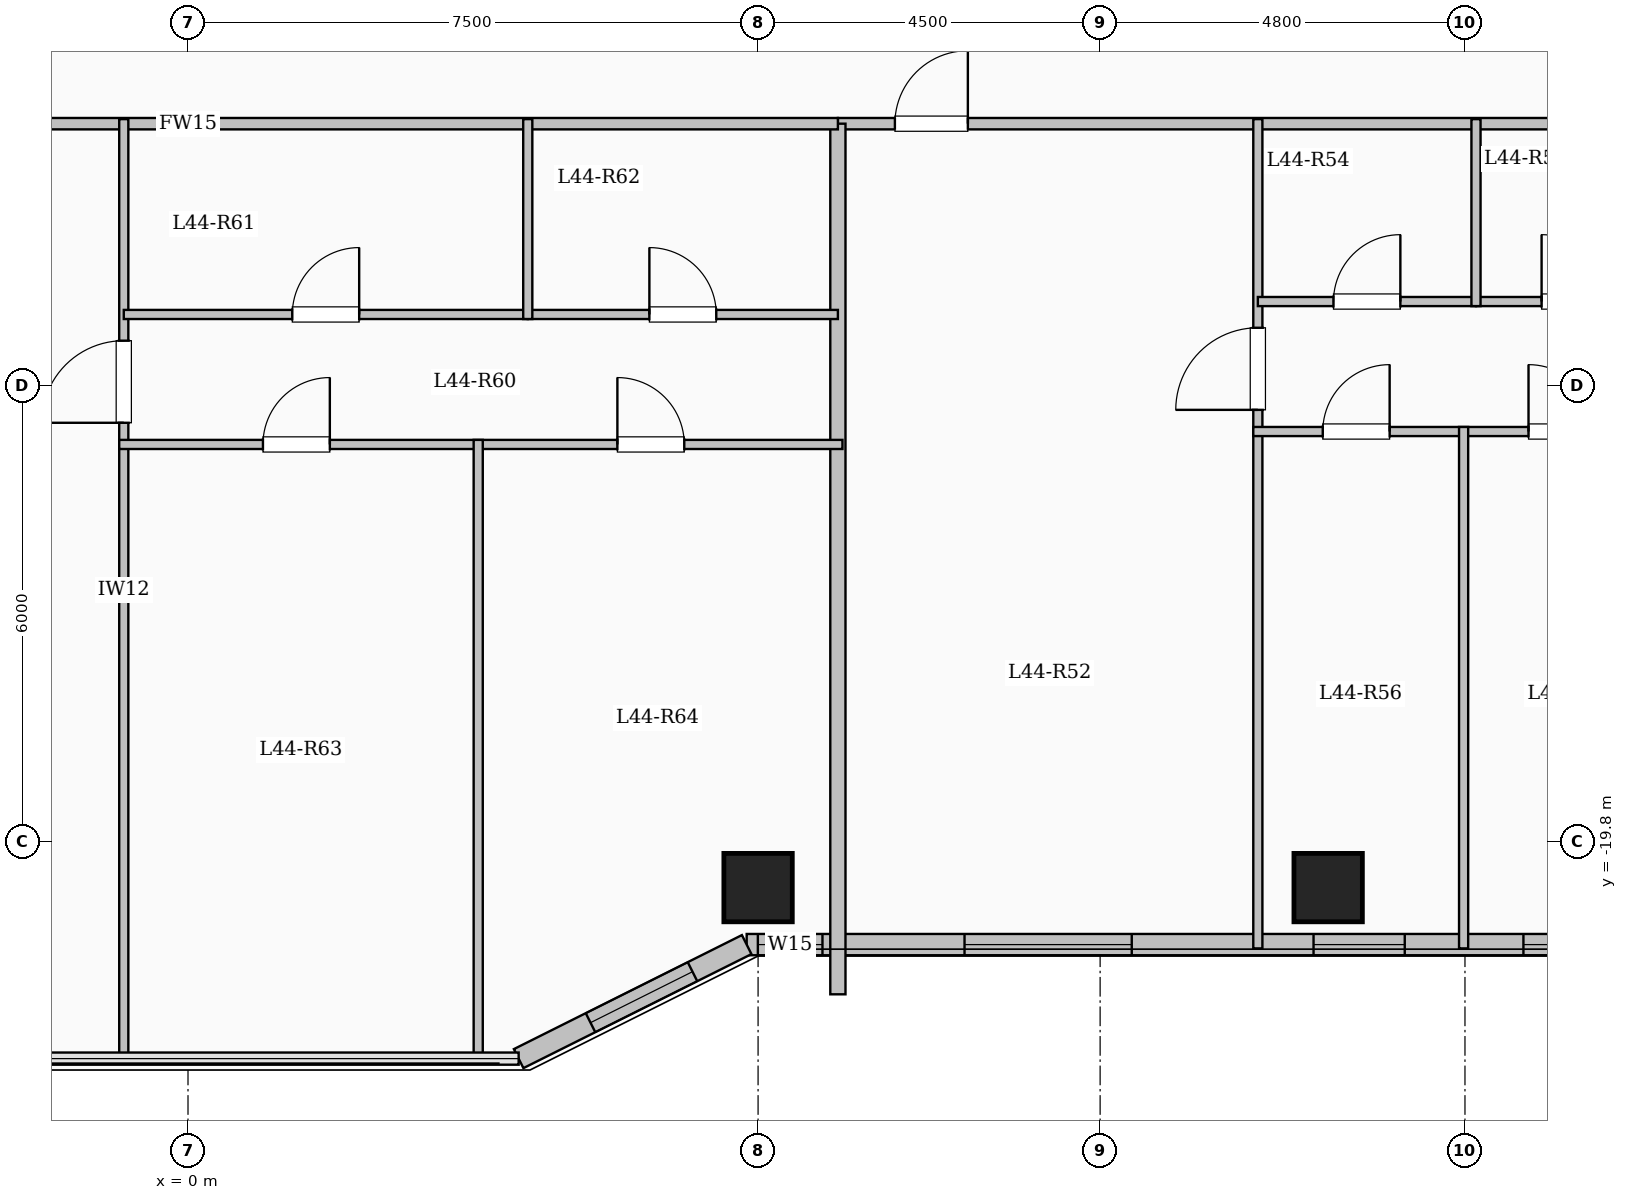
"""IFC4 building model, lengths in metres.
Left out: names, types, materials, properties, quantities, classifications, styles, units other than length and angle.
Written with IfcOpenShell. Run it as: python <this file> out.ifc"""

import sys

from ifc_helpers import new_model, si_unit, direction, frame, frame_2d, origin, origin_2d, place, context, subcontext, project, spatial, rectangle, extrude, element, fill, save


model = new_model("IFC4")
c1 = context("Model", 3, precision=1e-05, world=origin(), true_north=direction((0.0, 1.0)))
c2 = subcontext(c1, "Body", "Model", "MODEL_VIEW")
j1 = project(units=[si_unit("LENGTHUNIT", "METRE"), si_unit("PLANEANGLEUNIT", "RADIAN")], contexts=[c1])
p1 = place(None, origin())
s1 = spatial("IfcSite", under=j1, at=p1, CompositionType="ELEMENT")
p2 = place(p1, origin())
s2 = spatial("IfcBuilding", under=s1, at=p2, CompositionType="ELEMENT")
p3 = place(p2, frame((0.0, 0.0, 162.75)))
s3 = spatial("IfcBuildingStorey", under=s2, at=p3, CompositionType="ELEMENT", Elevation=162.75)
for number, where, z_axis, x_axis in (
    (1, (7.5, -20.4, 0.0), (0.0, 0.0, 1.0), (1.0, 0.0, 0.0)),
    (2, (15.0, -20.4, 0.0), (0.0, 0.0, 1.0), (1.0, 0.0, 0.0)),
):
    element("IfcColumn", number, at=place(p3, frame(where, z_axis=z_axis, x_axis=x_axis)), inside=s3, PredefinedType="COLUMN", context=c2, shape_type="SweptSolid", body=[
        extrude(rectangle(XDim=0.9, YDim=0.9, at=origin_2d()), origin(), (0.0, 0.0, 1.0), 3.35),
    ])
p4 = place(p3, frame((19.65, -21.15, 0.0), z_axis=(0.0, 0.0, 1.0), x_axis=(-1.0, 0.0, 0.0)))
e3 = element("IfcWall", 3, at=p4, inside=s3, PredefinedType="SOLIDWALL", context=c2, shape_type="SweptSolid", body=[
    extrude(rectangle(XDim=12.3, YDim=0.28, at=frame_2d((6.15, 0.0))), origin(), (0.0, 0.0, 1.0), 3.1),
])
p5 = place(p4, frame((0.881, 0.0, 0.95)))
e4 = element("IfcOpeningElement", 4, at=p5, cuts=e3, PredefinedType="OPENING", context=c2, shape_type="SweptSolid", body=[
    extrude(rectangle(XDim=1.2, YDim=1.5, at=frame_2d((0.6, 0.75))), frame((0.0, 0.15, 0.0), z_axis=(0.0, -1.0, 0.0), x_axis=(1.0, 0.0, 0.0)), (0.0, 0.0, 1.0), 0.3),
])
p6 = place(p4, frame((3.642, 0.0, 0.95)))
e5 = element("IfcOpeningElement", 5, at=p6, cuts=e3, PredefinedType="OPENING", context=c2, shape_type="SweptSolid", body=[
    extrude(rectangle(XDim=1.2, YDim=1.5, at=frame_2d((0.6, 0.75))), frame((0.0, 0.15, 0.0), z_axis=(0.0, -1.0, 0.0), x_axis=(1.0, 0.0, 0.0)), (0.0, 0.0, 1.0), 0.3),
])
p7 = place(p4, frame((7.234, 0.0, 0.9)))
e6 = element("IfcOpeningElement", 6, at=p7, cuts=e3, PredefinedType="OPENING", context=c2, shape_type="SweptSolid", body=[
    extrude(rectangle(XDim=2.2, YDim=1.75, at=frame_2d((1.1, 0.875))), frame((0.0, 0.15, 0.0), z_axis=(0.0, -1.0, 0.0), x_axis=(1.0, 0.0, 0.0)), (0.0, 0.0, 1.0), 0.3),
])
p8 = place(p4, frame((11.303, 0.0, 0.95)))
e7 = element("IfcOpeningElement", 7, at=p8, cuts=e3, PredefinedType="OPENING", context=c2, shape_type="SweptSolid", body=[
    extrude(rectangle(XDim=0.85, YDim=1.5, at=frame_2d((0.425, 0.75))), frame((0.0, 0.15, 0.0), z_axis=(0.0, -1.0, 0.0), x_axis=(1.0, 0.0, 0.0)), (0.0, 0.0, 1.0), 0.3),
])
p9 = place(p3, frame((7.35, -21.15, 0.0), z_axis=(0.0, 0.0, 1.0), x_axis=(-0.894427191, -0.4472135955, 0.0)))
e8 = element("IfcWall", 8, at=p9, inside=s3, PredefinedType="SOLIDWALL", context=c2, shape_type="SweptSolid", body=[
    extrude(rectangle(XDim=3.354, YDim=0.28, at=frame_2d((1.677, 0.0))), origin(), (0.0, 0.0, 1.0), 3.1),
])
p10 = place(p9, frame((0.797, 0.0, 0.9)))
e9 = element("IfcOpeningElement", 9, at=p10, cuts=e8, PredefinedType="OPENING", context=c2, shape_type="SweptSolid", body=[
    extrude(rectangle(XDim=1.5, YDim=1.65, at=frame_2d((0.75, 0.825))), frame((0.0, 0.15, 0.0), z_axis=(0.0, -1.0, 0.0), x_axis=(1.0, 0.0, 0.0)), (0.0, 0.0, 1.0), 0.3),
])
p11 = place(p3, frame((8.55, -10.35, 0.0), z_axis=(0.0, 0.0, 1.0), x_axis=(1.0, 0.0, 0.0)))
e10 = element("IfcWall", 10, at=p11, inside=s3, PredefinedType="PARTITIONING", context=c2, shape_type="SweptSolid", body=[
    extrude(rectangle(XDim=11.0, YDim=0.15, at=frame_2d((5.5, 0.0))), origin(), (0.0, 0.0, 1.0), 3.1),
])
p12 = place(p11, frame((0.75, 0.0, 0.0)))
e11 = element("IfcOpeningElement", 11, at=p12, cuts=e10, PredefinedType="OPENING", context=c2, shape_type="SweptSolid", body=[
    extrude(rectangle(XDim=0.96, YDim=2.15, at=frame_2d((0.48, 1.075))), frame((0.0, 0.085, 0.0), z_axis=(0.0, -1.0, 0.0), x_axis=(1.0, 0.0, 0.0)), (0.0, 0.0, 1.0), 0.17),
])
p13 = place(p3, frame((14.075, -21.2, 0.0), z_axis=(0.0, 0.0, 1.0), x_axis=(0.0, 1.0, 0.0)))
e12 = element("IfcWall", 12, at=p13, inside=s3, PredefinedType="PARTITIONING", context=c2, shape_type="SweptSolid", body=[
    extrude(rectangle(XDim=10.91, YDim=0.12, at=frame_2d((5.455, 0.0))), origin(), (0.0, 0.0, 1.0), 3.1),
])
p14 = place(p13, frame((7.085, 0.0, 0.0)))
e13 = element("IfcOpeningElement", 13, at=p14, cuts=e12, PredefinedType="OPENING", context=c2, shape_type="SweptSolid", body=[
    extrude(rectangle(XDim=1.08, YDim=2.15, at=frame_2d((0.54, 1.075))), frame((0.0, 0.07, 0.0), z_axis=(0.0, -1.0, 0.0), x_axis=(1.0, 0.0, 0.0)), (0.0, 0.0, 1.0), 0.14),
])
p15 = place(p3, frame((14.075, -12.69, 0.0), z_axis=(0.0, 0.0, 1.0), x_axis=(1.0, 0.0, 0.0)))
e14 = element("IfcWall", 14, at=p15, inside=s3, PredefinedType="PARTITIONING", context=c2, shape_type="SweptSolid", body=[
    extrude(rectangle(XDim=2.87, YDim=0.12, at=frame_2d((1.435, 0.0))), origin(), (0.0, 0.0, 1.0), 3.1),
])
p16 = place(p15, frame((0.995, 0.0, 0.0)))
e15 = element("IfcOpeningElement", 15, at=p16, cuts=e14, PredefinedType="OPENING", context=c2, shape_type="SweptSolid", body=[
    extrude(rectangle(XDim=0.88, YDim=2.1, at=frame_2d((0.44, 1.05))), frame((0.0, 0.07, 0.0), z_axis=(0.0, -1.0, 0.0), x_axis=(1.0, 0.0, 0.0)), (0.0, 0.0, 1.0), 0.14),
])
p17 = place(p3, frame((16.945, -12.69, 0.0), z_axis=(0.0, 0.0, 1.0), x_axis=(1.0, 0.0, 0.0)))
e16 = element("IfcWall", 16, at=p17, inside=s3, PredefinedType="PARTITIONING", context=c2, shape_type="SweptSolid", body=[
    extrude(rectangle(XDim=2.605, YDim=0.12, at=frame_2d((1.302, 0.0))), origin(), (0.0, 0.0, 1.0), 3.1),
])
p18 = place(p17, frame((0.863, 0.0, 0.0)))
e17 = element("IfcOpeningElement", 17, at=p18, cuts=e16, PredefinedType="OPENING", context=c2, shape_type="SweptSolid", body=[
    extrude(rectangle(XDim=0.88, YDim=2.1, at=frame_2d((0.44, 1.05))), frame((0.0, 0.07, 0.0), z_axis=(0.0, -1.0, 0.0), x_axis=(1.0, 0.0, 0.0)), (0.0, 0.0, 1.0), 0.14),
])
p19 = place(p3, frame((14.015, -14.4, 0.0), z_axis=(0.0, 0.0, 1.0), x_axis=(1.0, 0.0, 0.0)))
e18 = element("IfcWall", 18, at=p19, inside=s3, PredefinedType="PARTITIONING", context=c2, shape_type="SweptSolid", body=[
    extrude(rectangle(XDim=5.595, YDim=0.12, at=frame_2d((2.798, 0.0))), origin(), (0.0, 0.0, 1.0), 3.1),
])
p20 = place(p19, frame((0.914, 0.0, 0.0)))
e19 = element("IfcOpeningElement", 19, at=p20, cuts=e18, PredefinedType="OPENING", context=c2, shape_type="SweptSolid", body=[
    extrude(rectangle(XDim=0.88, YDim=2.1, at=frame_2d((0.44, 1.05))), frame((0.0, 0.07, 0.0), z_axis=(0.0, -1.0, 0.0), x_axis=(1.0, 0.0, 0.0)), (0.0, 0.0, 1.0), 0.14),
])
p21 = place(p19, frame((3.621, 0.0, 0.0)))
e20 = element("IfcOpeningElement", 20, at=p21, cuts=e18, PredefinedType="OPENING", context=c2, shape_type="SweptSolid", body=[
    extrude(rectangle(XDim=0.88, YDim=2.1, at=frame_2d((0.44, 1.05))), frame((0.0, 0.07, 0.0), z_axis=(0.0, -1.0, 0.0), x_axis=(1.0, 0.0, 0.0)), (0.0, 0.0, 1.0), 0.14),
])
p22 = place(p3, frame((16.945, -12.75, 0.0), z_axis=(0.0, 0.0, 1.0), x_axis=(0.0, 1.0, 0.0)))
e21 = element("IfcWall", 21, at=p22, inside=s3, PredefinedType="PARTITIONING", context=c2, shape_type="SweptSolid", body=[
    extrude(rectangle(XDim=2.46, YDim=0.12, at=frame_2d((1.23, 0.0))), origin(), (0.0, 0.0, 1.0), 3.1),
])
p23 = place(p3, frame((16.782, -21.2, 0.0), z_axis=(0.0, 0.0, 1.0), x_axis=(0.0, 1.0, 0.0)))
e22 = element("IfcWall", 22, at=p23, inside=s3, PredefinedType="PARTITIONING", context=c2, shape_type="SweptSolid", body=[
    extrude(rectangle(XDim=6.86, YDim=0.12, at=frame_2d((3.43, 0.0))), origin(), (0.0, 0.0, 1.0), 3.1),
])
p24 = place(p3, frame((8.55, -21.804, 0.0), z_axis=(0.0, 0.0, 1.0), x_axis=(0.0, 1.0, 0.0)))
e23 = element("IfcWall", 23, at=p24, inside=s3, PredefinedType="SOLIDWALL", context=c2, shape_type="SweptSolid", body=[
    extrude(rectangle(XDim=11.454, YDim=0.2, at=frame_2d((5.727, 0.0))), origin(), (0.0, 0.0, 1.0), 3.1),
])
p25 = place(p3, frame((-8.55, -10.35, 0.0), z_axis=(0.0, 0.0, 1.0), x_axis=(1.0, 0.0, 0.0)))
e24 = element("IfcWall", 24, at=p25, inside=s3, PredefinedType="PARTITIONING", context=c2, shape_type="SweptSolid", body=[
    extrude(rectangle(XDim=17.1, YDim=0.15, at=frame_2d((8.55, 0.0))), origin(), (0.0, 0.0, 1.0), 3.1),
])
p26 = place(p25, frame((1.6, 0.0, 0.0)))
e25 = element("IfcOpeningElement", 25, at=p26, cuts=e24, PredefinedType="OPENING", context=c2, shape_type="SweptSolid", body=[
    extrude(rectangle(XDim=0.96, YDim=2.15, at=frame_2d((0.48, 1.075))), frame((0.0, 0.085, 0.0), z_axis=(0.0, -1.0, 0.0), x_axis=(1.0, 0.0, 0.0)), (0.0, 0.0, 1.0), 0.17),
])
p27 = place(p3, frame((-0.845, -22.68, 0.0), z_axis=(0.0, 0.0, 1.0), x_axis=(0.0, 1.0, 0.0)))
e26 = element("IfcWall", 26, at=p27, inside=s3, PredefinedType="PARTITIONING", context=c2, shape_type="SweptSolid", body=[
    extrude(rectangle(XDim=12.39, YDim=0.12, at=frame_2d((6.195, 0.0))), origin(), (0.0, 0.0, 1.0), 3.1),
])
p28 = place(p27, frame((8.395, 0.0, 0.0)))
e27 = element("IfcOpeningElement", 27, at=p28, cuts=e26, PredefinedType="OPENING", context=c2, shape_type="SweptSolid", body=[
    extrude(rectangle(XDim=1.08, YDim=2.15, at=frame_2d((0.54, 1.075))), frame((0.0, 0.07, 0.0), z_axis=(0.0, -1.0, 0.0), x_axis=(1.0, 0.0, 0.0)), (0.0, 0.0, 1.0), 0.14),
])
p29 = place(p3, frame((-0.845, -12.86, 0.0), z_axis=(0.0, 0.0, 1.0), x_axis=(1.0, 0.0, 0.0)))
e28 = element("IfcWall", 28, at=p29, inside=s3, PredefinedType="PARTITIONING", context=c2, shape_type="SweptSolid", body=[
    extrude(rectangle(XDim=5.315, YDim=0.12, at=frame_2d((2.657, 0.0))), origin(), (0.0, 0.0, 1.0), 3.1),
])
p30 = place(p29, frame((2.217, 0.0, 0.0)))
e29 = element("IfcOpeningElement", 29, at=p30, cuts=e28, PredefinedType="OPENING", context=c2, shape_type="SweptSolid", body=[
    extrude(rectangle(XDim=0.88, YDim=2.1, at=frame_2d((0.44, 1.05))), frame((0.0, 0.07, 0.0), z_axis=(0.0, -1.0, 0.0), x_axis=(1.0, 0.0, 0.0)), (0.0, 0.0, 1.0), 0.14),
])
p31 = place(p3, frame((4.47, -12.86, 0.0), z_axis=(0.0, 0.0, 1.0), x_axis=(1.0, 0.0, 0.0)))
e30 = element("IfcWall", 30, at=p31, inside=s3, PredefinedType="PARTITIONING", context=c2, shape_type="SweptSolid", body=[
    extrude(rectangle(XDim=4.08, YDim=0.12, at=frame_2d((2.04, 0.0))), origin(), (0.0, 0.0, 1.0), 3.1),
])
p32 = place(p31, frame((1.6, 0.0, 0.0)))
e31 = element("IfcOpeningElement", 31, at=p32, cuts=e30, PredefinedType="OPENING", context=c2, shape_type="SweptSolid", body=[
    extrude(rectangle(XDim=0.88, YDim=2.1, at=frame_2d((0.44, 1.05))), frame((0.0, 0.07, 0.0), z_axis=(0.0, -1.0, 0.0), x_axis=(1.0, 0.0, 0.0)), (0.0, 0.0, 1.0), 0.14),
])
p33 = place(p3, frame((-0.905, -14.57, 0.0), z_axis=(0.0, 0.0, 1.0), x_axis=(1.0, 0.0, 0.0)))
e32 = element("IfcWall", 32, at=p33, inside=s3, PredefinedType="PARTITIONING", context=c2, shape_type="SweptSolid", body=[
    extrude(rectangle(XDim=9.515, YDim=0.12, at=frame_2d((4.758, 0.0))), origin(), (0.0, 0.0, 1.0), 3.1),
])
p34 = place(p33, frame((1.891, 0.0, 0.0)))
e33 = element("IfcOpeningElement", 33, at=p34, cuts=e32, PredefinedType="OPENING", context=c2, shape_type="SweptSolid", body=[
    extrude(rectangle(XDim=0.88, YDim=2.1, at=frame_2d((0.44, 1.05))), frame((0.0, 0.07, 0.0), z_axis=(0.0, -1.0, 0.0), x_axis=(1.0, 0.0, 0.0)), (0.0, 0.0, 1.0), 0.14),
])
p35 = place(p33, frame((6.554, 0.0, 0.0)))
e34 = element("IfcOpeningElement", 34, at=p35, cuts=e32, PredefinedType="OPENING", context=c2, shape_type="SweptSolid", body=[
    extrude(rectangle(XDim=0.88, YDim=2.1, at=frame_2d((0.44, 1.05))), frame((0.0, 0.07, 0.0), z_axis=(0.0, -1.0, 0.0), x_axis=(1.0, 0.0, 0.0)), (0.0, 0.0, 1.0), 0.14),
])
p36 = place(p3, frame((4.47, -12.92, 0.0), z_axis=(0.0, 0.0, 1.0), x_axis=(0.0, 1.0, 0.0)))
e35 = element("IfcWall", 35, at=p36, inside=s3, PredefinedType="PARTITIONING", context=c2, shape_type="SweptSolid", body=[
    extrude(rectangle(XDim=2.63, YDim=0.12, at=frame_2d((1.315, 0.0))), origin(), (0.0, 0.0, 1.0), 3.1),
])
p37 = place(p3, frame((3.818, -22.68, 0.0), z_axis=(0.0, 0.0, 1.0), x_axis=(0.0, 1.0, 0.0)))
e36 = element("IfcWall", 36, at=p37, inside=s3, PredefinedType="PARTITIONING", context=c2, shape_type="SweptSolid", body=[
    extrude(rectangle(XDim=8.17, YDim=0.12, at=frame_2d((4.085, 0.0))), origin(), (0.0, 0.0, 1.0), 3.1),
])
p38 = place(p5, origin())
e37 = element("IfcWindow", 37, at=p38, inside=s3, PartitioningType="SINGLE_PANEL", PredefinedType="WINDOW", context=c2, shape_type="SweptSolid", body=[
    extrude(rectangle(XDim=1.2, YDim=1.5, at=frame_2d((0.6, 0.75))), frame((0.0, 0.03, 0.0), z_axis=(0.0, -1.0, 0.0), x_axis=(1.0, 0.0, 0.0)), (0.0, 0.0, 1.0), 0.06),
])
fill(e4, e37)
p39 = place(p6, origin())
e38 = element("IfcWindow", 38, at=p39, inside=s3, PartitioningType="SINGLE_PANEL", PredefinedType="WINDOW", context=c2, shape_type="SweptSolid", body=[
    extrude(rectangle(XDim=1.2, YDim=1.5, at=frame_2d((0.6, 0.75))), frame((0.0, 0.03, 0.0), z_axis=(0.0, -1.0, 0.0), x_axis=(1.0, 0.0, 0.0)), (0.0, 0.0, 1.0), 0.06),
])
fill(e5, e38)
p40 = place(p7, origin())
e39 = element("IfcWindow", 39, at=p40, inside=s3, PartitioningType="SINGLE_PANEL", PredefinedType="WINDOW", context=c2, shape_type="SweptSolid", body=[
    extrude(rectangle(XDim=2.2, YDim=1.75, at=frame_2d((1.1, 0.875))), frame((0.0, 0.03, 0.0), z_axis=(0.0, -1.0, 0.0), x_axis=(1.0, 0.0, 0.0)), (0.0, 0.0, 1.0), 0.06),
])
fill(e6, e39)
p41 = place(p8, origin())
e40 = element("IfcWindow", 40, at=p41, inside=s3, PartitioningType="SINGLE_PANEL", PredefinedType="WINDOW", context=c2, shape_type="SweptSolid", body=[
    extrude(rectangle(XDim=0.85, YDim=1.5, at=frame_2d((0.425, 0.75))), frame((0.0, 0.03, 0.0), z_axis=(0.0, -1.0, 0.0), x_axis=(1.0, 0.0, 0.0)), (0.0, 0.0, 1.0), 0.06),
])
fill(e7, e40)
p42 = place(p10, origin())
e41 = element("IfcWindow", 41, at=p42, inside=s3, PartitioningType="SINGLE_PANEL", PredefinedType="WINDOW", context=c2, shape_type="SweptSolid", body=[
    extrude(rectangle(XDim=1.5, YDim=1.65, at=frame_2d((0.75, 0.825))), frame((0.0, 0.03, 0.0), z_axis=(0.0, -1.0, 0.0), x_axis=(1.0, 0.0, 0.0)), (0.0, 0.0, 1.0), 0.06),
])
fill(e9, e41)
p43 = place(p12, origin())
e42 = element("IfcDoor", 42, at=p43, inside=s3, OperationType="SINGLE_SWING_RIGHT", PredefinedType="DOOR", context=c2, shape_type="SweptSolid", body=[
    extrude(rectangle(XDim=0.96, YDim=2.15, at=frame_2d((0.48, 1.075))), frame((0.0, 0.025, 0.0), z_axis=(0.0, -1.0, 0.0), x_axis=(1.0, 0.0, 0.0)), (0.0, 0.0, 1.0), 0.05),
])
fill(e11, e42)
p44 = place(p14, origin())
e43 = element("IfcDoor", 43, at=p44, inside=s3, OperationType="SINGLE_SWING_LEFT", PredefinedType="DOOR", context=c2, shape_type="SweptSolid", body=[
    extrude(rectangle(XDim=1.08, YDim=2.15, at=frame_2d((0.54, 1.075))), frame((0.0, 0.025, 0.0), z_axis=(0.0, -1.0, 0.0), x_axis=(1.0, 0.0, 0.0)), (0.0, 0.0, 1.0), 0.05),
])
fill(e13, e43)
p45 = place(p16, origin())
e44 = element("IfcDoor", 44, at=p45, inside=s3, OperationType="SINGLE_SWING_RIGHT", PredefinedType="DOOR", context=c2, shape_type="SweptSolid", body=[
    extrude(rectangle(XDim=0.88, YDim=2.1, at=frame_2d((0.44, 1.05))), frame((0.0, 0.025, 0.0), z_axis=(0.0, -1.0, 0.0), x_axis=(1.0, 0.0, 0.0)), (0.0, 0.0, 1.0), 0.05),
])
fill(e15, e44)
p46 = place(p18, origin())
e45 = element("IfcDoor", 45, at=p46, inside=s3, OperationType="SINGLE_SWING_LEFT", PredefinedType="DOOR", context=c2, shape_type="SweptSolid", body=[
    extrude(rectangle(XDim=0.88, YDim=2.1, at=frame_2d((0.44, 1.05))), frame((0.0, 0.025, 0.0), z_axis=(0.0, -1.0, 0.0), x_axis=(1.0, 0.0, 0.0)), (0.0, 0.0, 1.0), 0.05),
])
fill(e17, e45)
p47 = place(p20, origin())
e46 = element("IfcDoor", 46, at=p47, inside=s3, OperationType="SINGLE_SWING_RIGHT", PredefinedType="DOOR", context=c2, shape_type="SweptSolid", body=[
    extrude(rectangle(XDim=0.88, YDim=2.1, at=frame_2d((0.44, 1.05))), frame((0.0, 0.025, 0.0), z_axis=(0.0, -1.0, 0.0), x_axis=(1.0, 0.0, 0.0)), (0.0, 0.0, 1.0), 0.05),
])
fill(e19, e46)
p48 = place(p21, origin())
e47 = element("IfcDoor", 47, at=p48, inside=s3, OperationType="SINGLE_SWING_LEFT", PredefinedType="DOOR", context=c2, shape_type="SweptSolid", body=[
    extrude(rectangle(XDim=0.88, YDim=2.1, at=frame_2d((0.44, 1.05))), frame((0.0, 0.025, 0.0), z_axis=(0.0, -1.0, 0.0), x_axis=(1.0, 0.0, 0.0)), (0.0, 0.0, 1.0), 0.05),
])
fill(e20, e47)
p49 = place(p28, origin())
e48 = element("IfcDoor", 48, at=p49, inside=s3, OperationType="SINGLE_SWING_LEFT", PredefinedType="DOOR", context=c2, shape_type="SweptSolid", body=[
    extrude(rectangle(XDim=1.08, YDim=2.15, at=frame_2d((0.54, 1.075))), frame((0.0, 0.025, 0.0), z_axis=(0.0, -1.0, 0.0), x_axis=(1.0, 0.0, 0.0)), (0.0, 0.0, 1.0), 0.05),
])
fill(e27, e48)
p50 = place(p30, origin())
e49 = element("IfcDoor", 49, at=p50, inside=s3, OperationType="SINGLE_SWING_RIGHT", PredefinedType="DOOR", context=c2, shape_type="SweptSolid", body=[
    extrude(rectangle(XDim=0.88, YDim=2.1, at=frame_2d((0.44, 1.05))), frame((0.0, 0.025, 0.0), z_axis=(0.0, -1.0, 0.0), x_axis=(1.0, 0.0, 0.0)), (0.0, 0.0, 1.0), 0.05),
])
fill(e29, e49)
p51 = place(p32, origin())
e50 = element("IfcDoor", 50, at=p51, inside=s3, OperationType="SINGLE_SWING_LEFT", PredefinedType="DOOR", context=c2, shape_type="SweptSolid", body=[
    extrude(rectangle(XDim=0.88, YDim=2.1, at=frame_2d((0.44, 1.05))), frame((0.0, 0.025, 0.0), z_axis=(0.0, -1.0, 0.0), x_axis=(1.0, 0.0, 0.0)), (0.0, 0.0, 1.0), 0.05),
])
fill(e31, e50)
p52 = place(p34, origin())
e51 = element("IfcDoor", 51, at=p52, inside=s3, OperationType="SINGLE_SWING_RIGHT", PredefinedType="DOOR", context=c2, shape_type="SweptSolid", body=[
    extrude(rectangle(XDim=0.88, YDim=2.1, at=frame_2d((0.44, 1.05))), frame((0.0, 0.025, 0.0), z_axis=(0.0, -1.0, 0.0), x_axis=(1.0, 0.0, 0.0)), (0.0, 0.0, 1.0), 0.05),
])
fill(e33, e51)
p53 = place(p35, origin())
e52 = element("IfcDoor", 52, at=p53, inside=s3, OperationType="SINGLE_SWING_LEFT", PredefinedType="DOOR", context=c2, shape_type="SweptSolid", body=[
    extrude(rectangle(XDim=0.88, YDim=2.1, at=frame_2d((0.44, 1.05))), frame((0.0, 0.025, 0.0), z_axis=(0.0, -1.0, 0.0), x_axis=(1.0, 0.0, 0.0)), (0.0, 0.0, 1.0), 0.05),
])
fill(e34, e52)
save(model, sys.argv[1])
